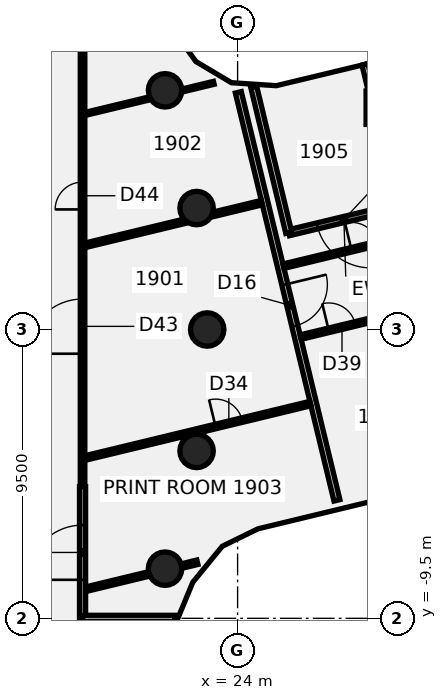
"""IFC4 building model, lengths in metres.
Left out: names, types, materials, properties, quantities, classifications, styles, units other than length and angle.
Written with IfcOpenShell. Run it as: python <this file> out.ifc"""

import sys

from ifc_helpers import new_model, si_unit, direction, frame, frame_2d, origin, origin_2d, place, context, subcontext, project, spatial, rectangle, circle, extrude, element, fill, save


model = new_model("IFC4")
c1 = context("Model", 3, precision=1e-05, world=origin(), true_north=direction((0.0, 1.0)))
c2 = subcontext(c1, "Body", "Model", "MODEL_VIEW")
j1 = project(units=[si_unit("LENGTHUNIT", "METRE"), si_unit("PLANEANGLEUNIT", "RADIAN")], contexts=[c1])
p1 = place(None, origin())
s1 = spatial("IfcSite", under=j1, at=p1, CompositionType="ELEMENT")
p2 = place(p1, origin())
s2 = spatial("IfcBuilding", under=s1, at=p2, CompositionType="ELEMENT")
p3 = place(p2, frame((0.0, 0.0, 83.5)))
s3 = spatial("IfcBuildingStorey", under=s2, at=p3, CompositionType="ELEMENT", Elevation=83.5)
for number, where, z_axis, x_axis in (
    (1, (23.0, 0.0, -0.14), (0.0, 0.0, 1.0), (1.0, 0.0, 0.0)),
    (2, (22.651, 3.994, -0.14), (0.0, 0.0, 1.0), (1.0, 0.0, 0.0)),
    (3, (21.613, 7.866, -0.14), (0.0, 0.0, 1.0), (1.0, 0.0, 0.0)),
    (4, (21.613, -7.866, -0.14), (0.0, 0.0, 1.0), (1.0, 0.0, 0.0)),
    (5, (22.651, -3.994, -0.14), (0.0, 0.0, 1.0), (1.0, 0.0, 0.0)),
):
    element("IfcColumn", number, at=place(p3, frame(where, z_axis=z_axis, x_axis=x_axis)), inside=s3, PredefinedType="COLUMN", context=c2, shape_type="SweptSolid", body=[
        extrude(circle(Radius=0.55, at=origin_2d()), origin(), (0.0, 0.0, 1.0), 3.75),
    ])
p4 = place(p3, frame((28.776, 7.296, -0.135), z_axis=(-0.035756232025, 0.03256487434, 0.998829825761), x_axis=(0.234790673308, -0.971219724637, 0.04006976669)))
e6 = element("IfcColumn", 6, at=p4, inside=s3, PredefinedType="COLUMN", context=c2, shape_type="SweptSolid", body=[
    extrude(rectangle(XDim=1.1, YDim=1.1, at=origin_2d()), origin(), (0.0, 0.0, 1.0), 3.749),
])
p5 = place(p3, frame((24.024, 7.801, 0.0), z_axis=(0.0, 0.0, 1.0), x_axis=(0.234909613641, -0.972017218684, 0.0)))
e7 = element("IfcWall", 7, at=p5, inside=s3, PredefinedType="PARTITIONING", context=c2, shape_type="SweptSolid", body=[
    extrude(rectangle(XDim=13.806, YDim=0.2, at=frame_2d((6.903, 0.0))), origin(), (0.0, 0.0, 1.0), 3.01),
])
p6 = place(p5, frame((6.507, 0.0, 0.0)))
e8 = element("IfcOpeningElement", 8, at=p6, cuts=e7, PredefinedType="OPENING", context=c2, shape_type="SweptSolid", body=[
    extrude(rectangle(XDim=1.4, YDim=2.1, at=frame_2d((0.7, 1.05))), frame((0.0, 0.11, 0.0), z_axis=(0.0, -1.0, 0.0), x_axis=(1.0, 0.0, 0.0)), (0.0, 0.0, 1.0), 0.22),
])
p7 = place(p3, frame((18.973, -4.229, 0.0), z_axis=(0.0, 0.0, 1.0), x_axis=(0.97203792935, 0.234823899775, 0.0)))
e9 = element("IfcWall", 9, at=p7, inside=s3, PredefinedType="PARTITIONING", context=c2, shape_type="SweptSolid", body=[
    extrude(rectangle(XDim=7.635, YDim=0.15, at=frame_2d((3.818, 0.0))), origin(), (0.0, 0.0, 1.0), 3.01),
])
p8 = place(p7, frame((4.425, 0.0, 0.0)))
e10 = element("IfcOpeningElement", 10, at=p8, cuts=e9, PredefinedType="OPENING", context=c2, shape_type="SweptSolid", body=[
    extrude(rectangle(XDim=0.9, YDim=2.1, at=frame_2d((0.45, 1.05))), frame((0.0, 0.085, 0.0), z_axis=(0.0, -1.0, 0.0), x_axis=(1.0, 0.0, 0.0)), (0.0, 0.0, 1.0), 0.17),
])
p9 = place(p3, frame((18.973, 2.767, 0.0), z_axis=(0.0, 0.0, 1.0), x_axis=(0.972049735002, 0.234775025681, 0.0)))
e11 = element("IfcWall", 11, at=p9, inside=s3, PredefinedType="PARTITIONING", context=c2, shape_type="SweptSolid", body=[
    extrude(rectangle(XDim=3.431, YDim=0.15, at=frame_2d((1.715, 0.0))), origin(), (0.0, 0.0, 1.0), 3.01),
])
p10 = place(p3, frame((23.152, 3.776, 0.0), z_axis=(0.0, 0.0, 1.0), x_axis=(0.972053847495, 0.234757997882, 0.0)))
e12 = element("IfcWall", 12, at=p10, inside=s3, PredefinedType="PARTITIONING", context=c2, shape_type="SweptSolid", body=[
    extrude(rectangle(XDim=1.693, YDim=0.15, at=frame_2d((0.847, 0.0))), origin(), (0.0, 0.0, 1.0), 3.01),
])
p11 = place(p3, frame((18.968, 7.086, 0.0), z_axis=(0.0, 0.0, 1.0), x_axis=(0.972061412661, 0.234726670865, 0.0)))
e13 = element("IfcWall", 13, at=p11, inside=s3, PredefinedType="PARTITIONING", context=c2, shape_type="SweptSolid", body=[
    extrude(rectangle(XDim=2.217, YDim=0.1, at=frame_2d((1.108, 0.0))), origin(), (0.0, 0.0, 1.0), 3.01),
])
p12 = place(p3, frame((22.171, 7.86, 0.0), z_axis=(0.0, 0.0, 1.0), x_axis=(0.972021486392, 0.234891953868, 0.0)))
e14 = element("IfcWall", 14, at=p12, inside=s3, PredefinedType="PARTITIONING", context=c2, shape_type="SweptSolid", body=[
    extrude(rectangle(XDim=1.076, YDim=0.1, at=frame_2d((0.538, 0.0))), origin(), (0.0, 0.0, 1.0), 3.01),
])
p13 = place(p3, frame((18.9, -8.568, 0.0), z_axis=(0.0, 0.0, 1.0), x_axis=(0.971998948833, 0.234985198402, 0.0)))
e15 = element("IfcWall", 15, at=p13, inside=s3, PredefinedType="PARTITIONING", context=c2, shape_type="SweptSolid", body=[
    extrude(rectangle(XDim=2.262, YDim=0.15, at=frame_2d((1.131, 0.0))), origin(), (0.0, 0.0, 1.0), 3.01),
])
p14 = place(p3, frame((22.15, -7.782, 0.0), z_axis=(0.0, 0.0, 1.0), x_axis=(0.972046753294, 0.234787370638, 0.0)))
e16 = element("IfcWall", 16, at=p14, inside=s3, PredefinedType="PARTITIONING", context=c2, shape_type="SweptSolid", body=[
    extrude(rectangle(XDim=0.542, YDim=0.15, at=frame_2d((0.271, 0.0))), origin(), (0.0, 0.0, 1.0), 3.01),
])
p15 = place(p3, frame((25.509, 2.083, 0.0), z_axis=(0.0, 0.0, 1.0), x_axis=(0.972038240332, 0.234822612482, 0.0)))
e17 = element("IfcWall", 17, at=p15, inside=s3, PredefinedType="PARTITIONING", context=c2, shape_type="SweptSolid", body=[
    extrude(rectangle(XDim=17.825, YDim=0.15, at=frame_2d((8.913, 0.0))), origin(), (0.0, 0.0, 1.0), 3.01),
])
p16 = place(p15, frame((2.3, 0.0, 0.0)))
e18 = element("IfcOpeningElement", 18, at=p16, cuts=e17, PredefinedType="OPENING", context=c2, shape_type="SweptSolid", body=[
    extrude(rectangle(XDim=0.9, YDim=2.1, at=frame_2d((0.45, 1.05))), frame((0.0, 0.085, 0.0), z_axis=(0.0, -1.0, 0.0), x_axis=(1.0, 0.0, 0.0)), (0.0, 0.0, 1.0), 0.17),
])
p17 = place(p15, frame((5.6, 0.0, 0.0)))
e19 = element("IfcOpeningElement", 19, at=p17, cuts=e17, PredefinedType="OPENING", context=c2, shape_type="SweptSolid", body=[
    extrude(rectangle(XDim=0.9, YDim=2.1, at=frame_2d((0.45, 1.05))), frame((0.0, 0.085, 0.0), z_axis=(0.0, -1.0, 0.0), x_axis=(1.0, 0.0, 0.0)), (0.0, 0.0, 1.0), 0.17),
])
p18 = place(p15, frame((11.3, 0.0, 0.0)))
e20 = element("IfcOpeningElement", 20, at=p18, cuts=e17, PredefinedType="OPENING", context=c2, shape_type="SweptSolid", body=[
    extrude(rectangle(XDim=0.9, YDim=2.1, at=frame_2d((0.45, 1.05))), frame((0.0, 0.085, 0.0), z_axis=(0.0, -1.0, 0.0), x_axis=(1.0, 0.0, 0.0)), (0.0, 0.0, 1.0), 0.17),
])
p19 = place(p15, frame((14.6, 0.0, 0.0)))
e21 = element("IfcOpeningElement", 21, at=p19, cuts=e17, PredefinedType="OPENING", context=c2, shape_type="SweptSolid", body=[
    extrude(rectangle(XDim=0.9, YDim=2.1, at=frame_2d((0.45, 1.05))), frame((0.0, 0.085, 0.0), z_axis=(0.0, -1.0, 0.0), x_axis=(1.0, 0.0, 0.0)), (0.0, 0.0, 1.0), 0.17),
])
p20 = place(p3, frame((26.073, -0.25, 0.0), z_axis=(0.0, 0.0, 1.0), x_axis=(0.972017500869, 0.234908446006, 0.0)))
e22 = element("IfcWall", 22, at=p20, inside=s3, PredefinedType="PARTITIONING", context=c2, shape_type="SweptSolid", body=[
    extrude(rectangle(XDim=3.86, YDim=0.15, at=frame_2d((1.93, 0.0))), origin(), (0.0, 0.0, 1.0), 3.01),
])
p21 = place(p20, frame((0.95, 0.0, 0.0)))
e23 = element("IfcOpeningElement", 23, at=p21, cuts=e22, PredefinedType="OPENING", context=c2, shape_type="SweptSolid", body=[
    extrude(rectangle(XDim=0.9, YDim=2.1, at=frame_2d((0.45, 1.05))), frame((0.0, 0.085, 0.0), z_axis=(0.0, -1.0, 0.0), x_axis=(1.0, 0.0, 0.0)), (0.0, 0.0, 1.0), 0.17),
])
p22 = place(p3, frame((18.9, -5.066, 0.0), z_axis=(0.0, 0.0, 1.0), x_axis=(0.0, 1.0, 0.0)))
e24 = element("IfcWall", 24, at=p22, inside=s3, PredefinedType="PARTITIONING", context=c2, shape_type="SweptSolid", body=[
    extrude(rectangle(XDim=15.166, YDim=0.15, at=frame_2d((7.583, 0.0))), origin(), (0.0, 0.0, 1.0), 3.01),
])
p23 = place(p22, frame((4.269, 0.0, 0.0)))
e25 = element("IfcOpeningElement", 25, at=p23, cuts=e24, PredefinedType="OPENING", context=c2, shape_type="SweptSolid", body=[
    extrude(rectangle(XDim=1.8, YDim=2.1, at=frame_2d((0.9, 1.05))), frame((0.0, 0.085, 0.0), z_axis=(0.0, -1.0, 0.0), x_axis=(1.0, 0.0, 0.0)), (0.0, 0.0, 1.0), 0.17),
])
p24 = place(p22, frame((9.015, 0.0, 0.0)))
e26 = element("IfcOpeningElement", 26, at=p24, cuts=e24, PredefinedType="OPENING", context=c2, shape_type="SweptSolid", body=[
    extrude(rectangle(XDim=0.9, YDim=2.1, at=frame_2d((0.45, 1.05))), frame((0.0, 0.085, 0.0), z_axis=(0.0, -1.0, 0.0), x_axis=(1.0, 0.0, 0.0)), (0.0, 0.0, 1.0), 0.17),
])
p25 = place(p3, frame((29.31, 4.053, 0.0), z_axis=(0.0, 0.0, 1.0), x_axis=(-0.972345695873, -0.233546243209, 0.0)))
e27 = element("IfcWall", 27, at=p25, inside=s3, PredefinedType="SOLIDWALL", context=c2, shape_type="SweptSolid", body=[
    extrude(rectangle(XDim=3.73, YDim=0.2, at=frame_2d((1.865, 0.0))), origin(), (0.0, 0.0, 1.0), 3.01),
])
p26 = place(p25, frame((0.965, 0.0, 0.0)))
e28 = element("IfcOpeningElement", 28, at=p26, cuts=e27, PredefinedType="OPENING", context=c2, shape_type="SweptSolid", body=[
    extrude(rectangle(XDim=1.8, YDim=2.4, at=frame_2d((0.9, 1.2))), frame((0.0, 0.11, 0.0), z_axis=(0.0, -1.0, 0.0), x_axis=(1.0, 0.0, 0.0)), (0.0, 0.0, 1.0), 0.22),
])
p27 = place(p3, frame((29.31, 4.053, 0.0), z_axis=(0.0, 0.0, 1.0), x_axis=(-0.233561470918, 0.972342038227, 0.0)))
e29 = element("IfcWall", 29, at=p27, inside=s3, PredefinedType="SOLIDWALL", context=c2, shape_type="SweptSolid", body=[
    extrude(rectangle(XDim=4.8, YDim=0.2, at=frame_2d((2.4, 0.0))), origin(), (0.0, 0.0, 1.0), 3.114),
])
p28 = place(p3, frame((25.683, 3.182, 0.0), z_axis=(0.0, 0.0, 1.0), x_axis=(-0.2335134947, 0.972353561105, 0.0)))
e30 = element("IfcWall", 30, at=p28, inside=s3, PredefinedType="SOLIDWALL", context=c2, shape_type="SweptSolid", body=[
    extrude(rectangle(XDim=4.927, YDim=0.2, at=frame_2d((2.464, 0.0))), origin(), (0.0, 0.0, 1.0), 3.114),
])
p29 = place(p3, frame((18.9, -9.5, 0.0), z_axis=(0.0, 0.0, 1.0), x_axis=(0.0, 1.0, 0.0)))
e31 = element("IfcWall", 31, at=p29, inside=s3, PredefinedType="SOLIDWALL", context=c2, shape_type="SweptSolid", body=[
    extrude(rectangle(XDim=4.334, YDim=0.2, at=frame_2d((2.167, 0.0))), origin(), (0.0, 0.0, 1.0), 3.014),
])
p30 = place(p29, frame((1.267, 0.0, 0.0)))
e32 = element("IfcOpeningElement", 32, at=p30, cuts=e31, PredefinedType="OPENING", context=c2, shape_type="SweptSolid", body=[
    extrude(rectangle(XDim=1.8, YDim=2.4, at=frame_2d((0.9, 1.2))), frame((0.0, 0.11, 0.0), z_axis=(0.0, -1.0, 0.0), x_axis=(1.0, 0.0, 0.0)), (0.0, 0.0, 1.0), 0.22),
])
p31 = place(p3, frame((18.9, -9.5, 0.0), z_axis=(0.0, 0.0, 1.0), x_axis=(1.0, 0.0, 0.0)))
e33 = element("IfcWall", 33, at=p31, inside=s3, PredefinedType="SOLIDWALL", context=c2, shape_type="SweptSolid", body=[
    extrude(rectangle(XDim=3.035, YDim=0.2, at=frame_2d((1.517, 0.0))), origin(), (0.0, 0.0, 1.0), 3.61),
])
p32 = place(p6, frame((1.4, 0.0, 0.0), z_axis=(0.0, 0.0, 1.0), x_axis=(-1.0, 0.0, 0.0)))
e34 = element("IfcDoor", 34, at=p32, inside=s3, OperationType="DOUBLE_DOOR_SINGLE_SWING", PredefinedType="DOOR", context=c2, shape_type="SweptSolid", body=[
    extrude(rectangle(XDim=1.4, YDim=2.1, at=frame_2d((0.7, 1.05))), frame((0.0, 0.025, 0.0), z_axis=(0.0, -1.0, 0.0), x_axis=(1.0, 0.0, 0.0)), (0.0, 0.0, 1.0), 0.05),
])
fill(e8, e34)
p33 = place(p8, frame((0.9, 0.0, 0.0), z_axis=(0.0, 0.0, 1.0), x_axis=(-1.0, 0.0, 0.0)))
e35 = element("IfcDoor", 35, at=p33, inside=s3, OperationType="SINGLE_SWING_RIGHT", PredefinedType="DOOR", context=c2, shape_type="SweptSolid", body=[
    extrude(rectangle(XDim=0.9, YDim=2.1, at=frame_2d((0.45, 1.05))), frame((0.0, 0.025, 0.0), z_axis=(0.0, -1.0, 0.0), x_axis=(1.0, 0.0, 0.0)), (0.0, 0.0, 1.0), 0.05),
])
fill(e10, e35)
p34 = place(p16, origin())
e36 = element("IfcDoor", 36, at=p34, inside=s3, OperationType="SINGLE_SWING_RIGHT", PredefinedType="DOOR", context=c2, shape_type="SweptSolid", body=[
    extrude(rectangle(XDim=0.9, YDim=2.1, at=frame_2d((0.45, 1.05))), frame((0.0, 0.025, 0.0), z_axis=(0.0, -1.0, 0.0), x_axis=(1.0, 0.0, 0.0)), (0.0, 0.0, 1.0), 0.05),
])
fill(e18, e36)
p35 = place(p21, frame((0.9, 0.0, 0.0), z_axis=(0.0, 0.0, 1.0), x_axis=(-1.0, 0.0, 0.0)))
e37 = element("IfcDoor", 37, at=p35, inside=s3, OperationType="SINGLE_SWING_LEFT", PredefinedType="DOOR", context=c2, shape_type="SweptSolid", body=[
    extrude(rectangle(XDim=0.9, YDim=2.1, at=frame_2d((0.45, 1.05))), frame((0.0, 0.025, 0.0), z_axis=(0.0, -1.0, 0.0), x_axis=(1.0, 0.0, 0.0)), (0.0, 0.0, 1.0), 0.05),
])
fill(e23, e37)
p36 = place(p23, origin())
e38 = element("IfcDoor", 38, at=p36, inside=s3, OperationType="DOUBLE_DOOR_SINGLE_SWING", PredefinedType="DOOR", context=c2, shape_type="SweptSolid", body=[
    extrude(rectangle(XDim=1.8, YDim=2.1, at=frame_2d((0.9, 1.05))), frame((0.0, 0.025, 0.0), z_axis=(0.0, -1.0, 0.0), x_axis=(1.0, 0.0, 0.0)), (0.0, 0.0, 1.0), 0.05),
])
fill(e25, e38)
p37 = place(p24, frame((0.9, 0.0, 0.0), z_axis=(0.0, 0.0, 1.0), x_axis=(-1.0, 0.0, 0.0)))
e39 = element("IfcDoor", 39, at=p37, inside=s3, OperationType="SINGLE_SWING_RIGHT", PredefinedType="DOOR", context=c2, shape_type="SweptSolid", body=[
    extrude(rectangle(XDim=0.9, YDim=2.1, at=frame_2d((0.45, 1.05))), frame((0.0, 0.025, 0.0), z_axis=(0.0, -1.0, 0.0), x_axis=(1.0, 0.0, 0.0)), (0.0, 0.0, 1.0), 0.05),
])
fill(e26, e39)
p38 = place(p26, origin())
e40 = element("IfcDoor", 40, at=p38, inside=s3, OperationType="SINGLE_SWING_LEFT", PredefinedType="DOOR", context=c2, shape_type="SweptSolid", body=[
    extrude(rectangle(XDim=1.8, YDim=2.4, at=frame_2d((0.9, 1.2))), frame((0.0, 0.025, 0.0), z_axis=(0.0, -1.0, 0.0), x_axis=(1.0, 0.0, 0.0)), (0.0, 0.0, 1.0), 0.05),
])
fill(e28, e40)
p39 = place(p30, origin())
e41 = element("IfcDoor", 41, at=p39, inside=s3, OperationType="SINGLE_SWING_LEFT", PredefinedType="DOOR", context=c2, shape_type="SweptSolid", body=[
    extrude(rectangle(XDim=1.8, YDim=2.4, at=frame_2d((0.9, 1.2))), frame((0.0, 0.025, 0.0), z_axis=(0.0, -1.0, 0.0), x_axis=(1.0, 0.0, 0.0)), (0.0, 0.0, 1.0), 0.05),
])
fill(e32, e41)
save(model, sys.argv[1])
